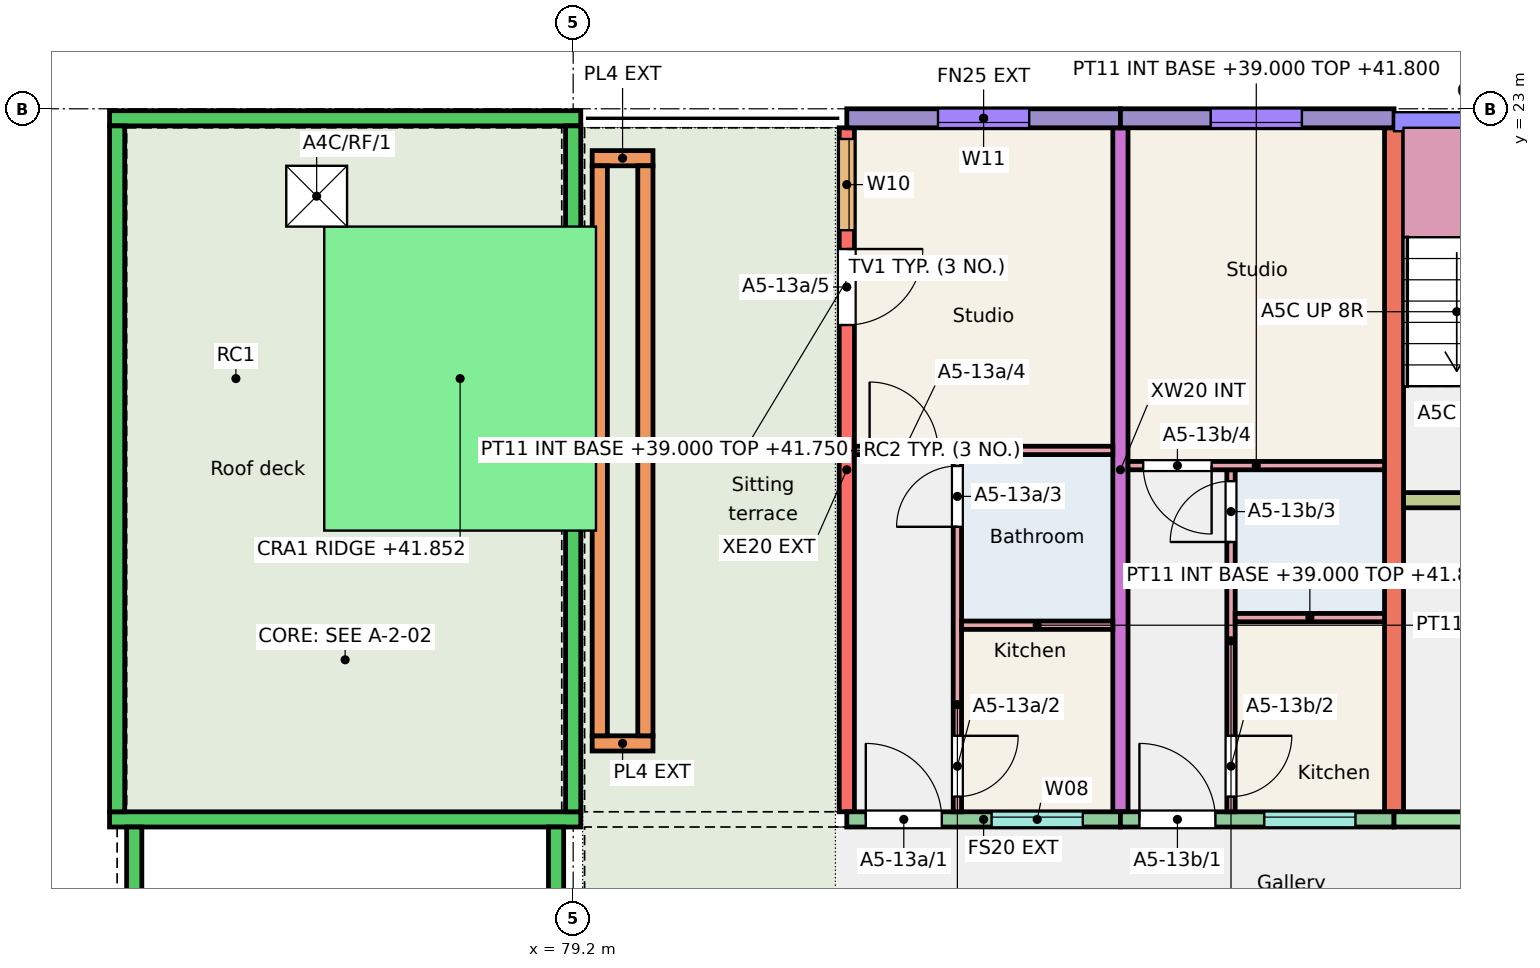
"""IFC4 building model, lengths in metres.
Left out: names, types, materials, properties, quantities, classifications, styles, units other than length and angle.
Written with IfcOpenShell. Run it as: python <this file> out.ifc"""

import sys

from ifc_helpers import new_model, si_unit, direction, frame, frame_2d, origin, origin_2d, place, context, subcontext, project, spatial, rectangle, extrude, element, fill, save


model = new_model("IFC4")
c1 = context("Model", 3, precision=1e-05, world=origin(), true_north=direction((0.0, 1.0)))
c2 = subcontext(c1, "Body", "Model", "MODEL_VIEW")
j1 = project(units=[si_unit("LENGTHUNIT", "METRE"), si_unit("PLANEANGLEUNIT", "RADIAN")], contexts=[c1])
p1 = place(None, origin())
s1 = spatial("IfcSite", under=j1, at=p1, CompositionType="ELEMENT")
p2 = place(p1, origin())
s2 = spatial("IfcBuilding", under=s1, at=p2, CompositionType="ELEMENT")
p3 = place(p2, frame((0.0, 0.0, 39.0)))
s3 = spatial("IfcBuildingStorey", under=s2, at=p3, CompositionType="ELEMENT", Elevation=39.0)
p4 = place(p3, frame((82.8, 13.75, 0.0), z_axis=(0.0, 0.0, 1.0), x_axis=(0.0, 1.0, 0.0)))
e1 = element("IfcWall", 1, at=p4, inside=s3, PredefinedType="SHEAR", context=c2, shape_type="SweptSolid", body=[
    extrude(rectangle(XDim=9.0, YDim=0.2, at=frame_2d((4.5, 0.0))), origin(), (0.0, 0.0, 1.0), 3.0),
])
p5 = place(p4, frame((7.653, 0.0, 0.9)))
e2 = element("IfcOpeningElement", 2, at=p5, cuts=e1, PredefinedType="OPENING", context=c2, shape_type="SweptSolid", body=[
    extrude(rectangle(XDim=1.2, YDim=1.5, at=frame_2d((0.6, 0.75))), frame((0.0, 0.11, 0.0), z_axis=(0.0, -1.0, 0.0), x_axis=(1.0, 0.0, 0.0)), (0.0, 0.0, 1.0), 0.22),
])
p6 = place(p4, frame((6.405, 0.0, 0.0)))
e3 = element("IfcOpeningElement", 3, at=p6, cuts=e1, PredefinedType="OPENING", context=c2, shape_type="SweptSolid", body=[
    extrude(rectangle(XDim=1.0, YDim=2.1, at=frame_2d((0.5, 1.05))), frame((0.0, 0.11, 0.0), z_axis=(0.0, -1.0, 0.0), x_axis=(1.0, 0.0, 0.0)), (0.0, 0.0, 1.0), 0.22),
])
p7 = place(p3, frame((86.4, 13.75, 0.0), z_axis=(0.0, 0.0, 1.0), x_axis=(0.0, 1.0, 0.0)))
e4 = element("IfcWall", 4, at=p7, inside=s3, PredefinedType="SHEAR", context=c2, shape_type="SweptSolid", body=[
    extrude(rectangle(XDim=9.0, YDim=0.2, at=frame_2d((4.5, 0.0))), origin(), (0.0, 0.0, 1.0), 3.0),
])
p8 = place(p3, frame((90.0, 13.75, 0.0), z_axis=(0.0, 0.0, 1.0), x_axis=(0.0, 1.0, 0.0)))
e5 = element("IfcWall", 5, at=p8, inside=s3, PredefinedType="SHEAR", context=c2, shape_type="SweptSolid", body=[
    extrude(rectangle(XDim=9.0, YDim=0.25, at=frame_2d((4.5, 0.0))), origin(), (0.0, 0.0, 1.0), 3.0),
])
p9 = place(p3, frame((82.8, 22.875, 0.0), z_axis=(0.0, 0.0, 1.0), x_axis=(1.0, 0.0, 0.0)))
e6 = element("IfcWall", 6, at=p9, inside=s3, PredefinedType="SOLIDWALL", context=c2, shape_type="SweptSolid", body=[
    extrude(rectangle(XDim=3.6, YDim=0.25, at=frame_2d((1.8, 0.0))), origin(), (0.0, 0.0, 1.0), 3.0),
])
p10 = place(p9, frame((1.2, 0.0, 0.8)))
e7 = element("IfcOpeningElement", 7, at=p10, cuts=e6, PredefinedType="OPENING", context=c2, shape_type="SweptSolid", body=[
    extrude(rectangle(XDim=1.2, YDim=1.6, at=frame_2d((0.6, 0.8))), frame((0.0, 0.135, 0.0), z_axis=(0.0, -1.0, 0.0), x_axis=(1.0, 0.0, 0.0)), (0.0, 0.0, 1.0), 0.27),
])
p11 = place(p3, frame((82.8, 13.65, 0.0), z_axis=(0.0, 0.0, 1.0), x_axis=(1.0, 0.0, 0.0)))
e8 = element("IfcWall", 8, at=p11, inside=s3, PredefinedType="SOLIDWALL", context=c2, shape_type="SweptSolid", body=[
    extrude(rectangle(XDim=3.6, YDim=0.2, at=frame_2d((1.8, 0.0))), origin(), (0.0, 0.0, 1.0), 3.0),
])
p12 = place(p11, frame((1.905, 0.0, 1.1)))
e9 = element("IfcOpeningElement", 9, at=p12, cuts=e8, PredefinedType="OPENING", context=c2, shape_type="SweptSolid", body=[
    extrude(rectangle(XDim=1.2, YDim=1.3, at=frame_2d((0.6, 0.65))), frame((0.0, 0.11, 0.0), z_axis=(0.0, -1.0, 0.0), x_axis=(1.0, 0.0, 0.0)), (0.0, 0.0, 1.0), 0.22),
])
p13 = place(p11, frame((0.25, 0.0, 0.0)))
e10 = element("IfcOpeningElement", 10, at=p13, cuts=e8, PredefinedType="OPENING", context=c2, shape_type="SweptSolid", body=[
    extrude(rectangle(XDim=1.0, YDim=2.1, at=frame_2d((0.5, 1.05))), frame((0.0, 0.11, 0.0), z_axis=(0.0, -1.0, 0.0), x_axis=(1.0, 0.0, 0.0)), (0.0, 0.0, 1.0), 0.22),
])
p14 = place(p3, frame((86.4, 22.875, 0.0), z_axis=(0.0, 0.0, 1.0), x_axis=(1.0, 0.0, 0.0)))
e11 = element("IfcWall", 11, at=p14, inside=s3, PredefinedType="SOLIDWALL", context=c2, shape_type="SweptSolid", body=[
    extrude(rectangle(XDim=3.6, YDim=0.25, at=frame_2d((1.8, 0.0))), origin(), (0.0, 0.0, 1.0), 3.0),
])
p15 = place(p14, frame((1.188, 0.0, 0.8)))
e12 = element("IfcOpeningElement", 12, at=p15, cuts=e11, PredefinedType="OPENING", context=c2, shape_type="SweptSolid", body=[
    extrude(rectangle(XDim=1.2, YDim=1.6, at=frame_2d((0.6, 0.8))), frame((0.0, 0.135, 0.0), z_axis=(0.0, -1.0, 0.0), x_axis=(1.0, 0.0, 0.0)), (0.0, 0.0, 1.0), 0.27),
])
p16 = place(p3, frame((86.4, 13.65, 0.0), z_axis=(0.0, 0.0, 1.0), x_axis=(1.0, 0.0, 0.0)))
e13 = element("IfcWall", 13, at=p16, inside=s3, PredefinedType="SOLIDWALL", context=c2, shape_type="SweptSolid", body=[
    extrude(rectangle(XDim=3.6, YDim=0.2, at=frame_2d((1.8, 0.0))), origin(), (0.0, 0.0, 1.0), 3.0),
])
p17 = place(p16, frame((1.893, 0.0, 1.1)))
e14 = element("IfcOpeningElement", 14, at=p17, cuts=e13, PredefinedType="OPENING", context=c2, shape_type="SweptSolid", body=[
    extrude(rectangle(XDim=1.2, YDim=1.3, at=frame_2d((0.6, 0.65))), frame((0.0, 0.11, 0.0), z_axis=(0.0, -1.0, 0.0), x_axis=(1.0, 0.0, 0.0)), (0.0, 0.0, 1.0), 0.22),
])
p18 = place(p16, frame((0.25, 0.0, 0.0)))
e15 = element("IfcOpeningElement", 15, at=p18, cuts=e13, PredefinedType="OPENING", context=c2, shape_type="SweptSolid", body=[
    extrude(rectangle(XDim=1.0, YDim=2.1, at=frame_2d((0.5, 1.05))), frame((0.0, 0.11, 0.0), z_axis=(0.0, -1.0, 0.0), x_axis=(1.0, 0.0, 0.0)), (0.0, 0.0, 1.0), 0.22),
])
p19 = place(p3, frame((90.0, 13.65, 0.0), z_axis=(0.0, 0.0, 1.0), x_axis=(1.0, 0.0, 0.0)))
e16 = element("IfcWall", 16, at=p19, inside=s3, PredefinedType="SHEAR", context=c2, shape_type="SweptSolid", body=[
    extrude(rectangle(XDim=5.85, YDim=0.2, at=frame_2d((2.925, 0.0))), origin(), (0.0, 0.0, 1.0), 3.0),
])
p20 = place(p19, frame((2.438, 0.0, 0.0)))
e17 = element("IfcOpeningElement", 17, at=p20, cuts=e16, PredefinedType="OPENING", context=c2, shape_type="SweptSolid", body=[
    extrude(rectangle(XDim=1.1, YDim=2.1, at=frame_2d((0.55, 1.05))), frame((0.0, 0.11, 0.0), z_axis=(0.0, -1.0, 0.0), x_axis=(1.0, 0.0, 0.0)), (0.0, 0.0, 1.0), 0.22),
])
p21 = place(p3, frame((90.125, 17.85, 0.0), z_axis=(0.0, 0.0, 1.0), x_axis=(1.0, 0.0, 0.0)))
e18 = element("IfcWall", 18, at=p21, inside=s3, PredefinedType="SHEAR", context=c2, shape_type="SweptSolid", body=[
    extrude(rectangle(XDim=5.725, YDim=0.2, at=frame_2d((2.863, 0.0))), origin(), (0.0, 0.0, 1.0), 3.0),
])
p22 = place(p21, frame((0.95, 0.0, 0.0)))
e19 = element("IfcOpeningElement", 19, at=p22, cuts=e18, PredefinedType="OPENING", context=c2, shape_type="SweptSolid", body=[
    extrude(rectangle(XDim=1.0, YDim=2.1, at=frame_2d((0.5, 1.05))), frame((0.0, 0.11, 0.0), z_axis=(0.0, -1.0, 0.0), x_axis=(1.0, 0.0, 0.0)), (0.0, 0.0, 1.0), 0.22),
])
p23 = place(p21, frame((3.863, 0.0, 0.0)))
e20 = element("IfcOpeningElement", 20, at=p23, cuts=e18, PredefinedType="OPENING", context=c2, shape_type="SweptSolid", body=[
    extrude(rectangle(XDim=1.1, YDim=2.1, at=frame_2d((0.55, 1.05))), frame((0.0, 0.11, 0.0), z_axis=(0.0, -1.0, 0.0), x_axis=(1.0, 0.0, 0.0)), (0.0, 0.0, 1.0), 0.22),
])
for number, where, z_axis, x_axis in (
    (21, (76.225, 17.85, 0.0), (0.0, 0.0, 1.0), (1.0, 0.0, 0.0)),
    (22, (76.225, 21.05, 0.0), (0.0, 0.0, 1.0), (1.0, 0.0, 0.0)),
):
    element("IfcWall", number, at=place(p3, frame(where, z_axis=z_axis, x_axis=x_axis)), inside=s3, PredefinedType="SHEAR", context=c2, shape_type="SweptSolid", body=[
        extrude(rectangle(XDim=2.975, YDim=0.2, at=frame_2d((1.487, 0.0))), origin(), (0.0, 0.0, 1.0), 1.5),
    ])
p24 = place(p3, frame((76.325, 17.95, 0.0), z_axis=(0.0, 0.0, 1.0), x_axis=(0.0, 1.0, 0.0)))
e23 = element("IfcWall", 23, at=p24, inside=s3, PredefinedType="SHEAR", context=c2, shape_type="SweptSolid", body=[
    extrude(rectangle(XDim=3.0, YDim=0.2, at=frame_2d((1.5, 0.0))), origin(), (0.0, 0.0, 1.0), 1.5),
])
p25 = place(p3, frame((79.125, 17.95, 0.0), z_axis=(0.0, 0.0, 1.0), x_axis=(0.0, 1.0, 0.0)))
e24 = element("IfcWall", 24, at=p25, inside=s3, PredefinedType="SHEAR", context=c2, shape_type="SweptSolid", body=[
    extrude(rectangle(XDim=3.0, YDim=0.15, at=frame_2d((1.5, 0.0))), origin(), (0.0, 0.0, 1.0), 1.5),
])
for number, where, z_axis, x_axis in (
    (25, (73.1, 22.875, 0.0), (0.0, 0.0, 1.0), (1.0, 0.0, 0.0)),
    (26, (73.1, 13.65, 0.0), (0.0, 0.0, 1.0), (1.0, 0.0, 0.0)),
):
    element("IfcWall", number, at=place(p3, frame(where, z_axis=z_axis, x_axis=x_axis)), inside=s3, PredefinedType="PARAPET", context=c2, shape_type="SweptSolid", body=[
        extrude(rectangle(XDim=6.2, YDim=0.2, at=frame_2d((3.1, 0.0))), origin(), (0.0, 0.0, 1.0), 1.1),
    ])
p26 = place(p3, frame((73.2, 13.75, 0.0), z_axis=(0.0, 0.0, 1.0), x_axis=(0.0, 1.0, 0.0)))
e27 = element("IfcWall", 27, at=p26, inside=s3, PredefinedType="PARAPET", context=c2, shape_type="SweptSolid", body=[
    extrude(rectangle(XDim=9.025, YDim=0.2, at=frame_2d((4.512, 0.0))), origin(), (0.0, 0.0, 1.0), 1.1),
])
p27 = place(p3, frame((79.2, 13.75, 0.0), z_axis=(0.0, 0.0, 1.0), x_axis=(0.0, 1.0, 0.0)))
e28 = element("IfcWall", 28, at=p27, inside=s3, PredefinedType="PARAPET", context=c2, shape_type="SweptSolid", body=[
    extrude(rectangle(XDim=4.0, YDim=0.2, at=frame_2d((2.0, 0.0))), origin(), (0.0, 0.0, 1.0), 1.1),
])
p28 = place(p3, frame((79.2, 21.15, 0.0), z_axis=(0.0, 0.0, 1.0), x_axis=(0.0, 1.0, 0.0)))
e29 = element("IfcWall", 29, at=p28, inside=s3, PredefinedType="PARAPET", context=c2, shape_type="SweptSolid", body=[
    extrude(rectangle(XDim=1.625, YDim=0.2, at=frame_2d((0.812, 0.0))), origin(), (0.0, 0.0, 1.0), 1.1),
])
for number, where, z_axis, x_axis in (
    (30, (73.425, 11.975, 0.0), (0.0, 0.0, 1.0), (0.0, 1.0, 0.0)),
    (31, (78.975, 11.975, 0.0), (0.0, 0.0, 1.0), (0.0, 1.0, 0.0)),
):
    element("IfcWall", number, at=place(p3, frame(where, z_axis=z_axis, x_axis=x_axis)), inside=s3, PredefinedType="PARAPET", context=c2, shape_type="SweptSolid", body=[
        extrude(rectangle(XDim=1.575, YDim=0.2, at=frame_2d((0.788, 0.0))), origin(), (0.0, 0.0, 1.0), 1.1),
    ])
for number, where, z_axis, x_axis in (
    (32, (79.45, 14.65, 0.01), (0.0, 0.0, 1.0), (1.0, 0.0, 0.0)),
    (33, (79.45, 22.35, 0.01), (0.0, 0.0, 1.0), (1.0, 0.0, 0.0)),
):
    element("IfcWall", number, at=place(p3, frame(where, z_axis=z_axis, x_axis=x_axis)), inside=s3, PredefinedType="SOLIDWALL", context=c2, shape_type="SweptSolid", body=[
        extrude(rectangle(XDim=0.8, YDim=0.2, at=frame_2d((0.4, 0.0))), origin(), (0.0, 0.0, 1.0), 0.45),
    ])
for number, where, z_axis, x_axis in (
    (34, (79.55, 14.75, 0.01), (0.0, 0.0, 1.0), (0.0, 1.0, 0.0)),
    (35, (80.15, 14.75, 0.01), (0.0, 0.0, 1.0), (0.0, 1.0, 0.0)),
):
    element("IfcWall", number, at=place(p3, frame(where, z_axis=z_axis, x_axis=x_axis)), inside=s3, PredefinedType="SOLIDWALL", context=c2, shape_type="SweptSolid", body=[
        extrude(rectangle(XDim=7.5, YDim=0.2, at=frame_2d((3.75, 0.0))), origin(), (0.0, 0.0, 1.0), 0.45),
    ])
p29 = place(p3, frame((84.255, 13.75, 0.0), z_axis=(0.0, 0.0, 1.0), x_axis=(0.0, 1.0, 0.0)))
e36 = element("IfcWall", 36, at=p29, inside=s3, PredefinedType="PARTITIONING", context=c2, shape_type="SweptSolid", body=[
    extrude(rectangle(XDim=4.7, YDim=0.11, at=frame_2d((2.35, 0.0))), origin(), (0.0, 0.0, 1.0), 2.75),
])
p30 = place(p29, frame((0.2, 0.0, 0.0)))
e37 = element("IfcOpeningElement", 37, at=p30, cuts=e36, PredefinedType="OPENING", context=c2, shape_type="SweptSolid", body=[
    extrude(rectangle(XDim=0.8, YDim=2.1, at=frame_2d((0.4, 1.05))), frame((0.0, 0.065, 0.0), z_axis=(0.0, -1.0, 0.0), x_axis=(1.0, 0.0, 0.0)), (0.0, 0.0, 1.0), 0.13),
])
p31 = place(p29, frame((3.75, 0.0, 0.0)))
e38 = element("IfcOpeningElement", 38, at=p31, cuts=e36, PredefinedType="OPENING", context=c2, shape_type="SweptSolid", body=[
    extrude(rectangle(XDim=0.8, YDim=2.1, at=frame_2d((0.4, 1.05))), frame((0.0, 0.065, 0.0), z_axis=(0.0, -1.0, 0.0), x_axis=(1.0, 0.0, 0.0)), (0.0, 0.0, 1.0), 0.13),
])
p32 = place(p3, frame((84.31, 16.205, 0.0), z_axis=(0.0, 0.0, 1.0), x_axis=(1.0, 0.0, 0.0)))
e39 = element("IfcWall", 39, at=p32, inside=s3, PredefinedType="PARTITIONING", context=c2, shape_type="SweptSolid", body=[
    extrude(rectangle(XDim=1.99, YDim=0.11, at=frame_2d((0.995, 0.0))), origin(), (0.0, 0.0, 1.0), 2.75),
])
p33 = place(p3, frame((82.9, 18.505, 0.0), z_axis=(0.0, 0.0, 1.0), x_axis=(1.0, 0.0, 0.0)))
e40 = element("IfcWall", 40, at=p33, inside=s3, PredefinedType="PARTITIONING", context=c2, shape_type="SweptSolid", body=[
    extrude(rectangle(XDim=3.4, YDim=0.11, at=frame_2d((1.7, 0.0))), origin(), (0.0, 0.0, 1.0), 2.75),
])
p34 = place(p33, frame((0.2, 0.0, 0.0)))
e41 = element("IfcOpeningElement", 41, at=p34, cuts=e40, PredefinedType="OPENING", context=c2, shape_type="SweptSolid", body=[
    extrude(rectangle(XDim=0.9, YDim=2.1, at=frame_2d((0.45, 1.05))), frame((0.0, 0.065, 0.0), z_axis=(0.0, -1.0, 0.0), x_axis=(1.0, 0.0, 0.0)), (0.0, 0.0, 1.0), 0.13),
])
p35 = place(p3, frame((87.855, 13.75, 0.0), z_axis=(0.0, 0.0, 1.0), x_axis=(0.0, 1.0, 0.0)))
e42 = element("IfcWall", 42, at=p35, inside=s3, PredefinedType="PARTITIONING", context=c2, shape_type="SweptSolid", body=[
    extrude(rectangle(XDim=4.5, YDim=0.11, at=frame_2d((2.25, 0.0))), origin(), (0.0, 0.0, 1.0), 2.8),
])
p36 = place(p35, frame((0.2, 0.0, 0.0)))
e43 = element("IfcOpeningElement", 43, at=p36, cuts=e42, PredefinedType="OPENING", context=c2, shape_type="SweptSolid", body=[
    extrude(rectangle(XDim=0.8, YDim=2.1, at=frame_2d((0.4, 1.05))), frame((0.0, 0.065, 0.0), z_axis=(0.0, -1.0, 0.0), x_axis=(1.0, 0.0, 0.0)), (0.0, 0.0, 1.0), 0.13),
])
p37 = place(p35, frame((3.55, 0.0, 0.0)))
e44 = element("IfcOpeningElement", 44, at=p37, cuts=e42, PredefinedType="OPENING", context=c2, shape_type="SweptSolid", body=[
    extrude(rectangle(XDim=0.8, YDim=2.1, at=frame_2d((0.4, 1.05))), frame((0.0, 0.065, 0.0), z_axis=(0.0, -1.0, 0.0), x_axis=(1.0, 0.0, 0.0)), (0.0, 0.0, 1.0), 0.13),
])
p38 = place(p3, frame((87.91, 16.305, 0.0), z_axis=(0.0, 0.0, 1.0), x_axis=(1.0, 0.0, 0.0)))
e45 = element("IfcWall", 45, at=p38, inside=s3, PredefinedType="PARTITIONING", context=c2, shape_type="SweptSolid", body=[
    extrude(rectangle(XDim=1.965, YDim=0.11, at=frame_2d((0.982, 0.0))), origin(), (0.0, 0.0, 1.0), 2.8),
])
p39 = place(p3, frame((86.5, 18.305, 0.0), z_axis=(0.0, 0.0, 1.0), x_axis=(1.0, 0.0, 0.0)))
e46 = element("IfcWall", 46, at=p39, inside=s3, PredefinedType="PARTITIONING", context=c2, shape_type="SweptSolid", body=[
    extrude(rectangle(XDim=3.375, YDim=0.11, at=frame_2d((1.688, 0.0))), origin(), (0.0, 0.0, 1.0), 2.8),
])
p40 = place(p39, frame((0.2, 0.0, 0.0)))
e47 = element("IfcOpeningElement", 47, at=p40, cuts=e46, PredefinedType="OPENING", context=c2, shape_type="SweptSolid", body=[
    extrude(rectangle(XDim=0.9, YDim=2.1, at=frame_2d((0.45, 1.05))), frame((0.0, 0.065, 0.0), z_axis=(0.0, -1.0, 0.0), x_axis=(1.0, 0.0, 0.0)), (0.0, 0.0, 1.0), 0.13),
])
p41 = place(p3, frame((0.0, 0.0, -0.25)))
p42 = place(p41, frame((75.825, 21.85, 0.0)))
p43 = place(p42, frame((0.0, 0.0, 0.2)))
e48 = element("IfcDoor", 48, at=p43, inside=s3, OperationType="SINGLE_SWING_LEFT", PredefinedType="TRAPDOOR", context=c2, shape_type="SweptSolid", body=[
    extrude(rectangle(XDim=0.8, YDim=0.8, at=origin_2d()), origin(), (0.0, 0.0, 1.0), 0.05),
])
p44 = place(p12, origin())
e49 = element("IfcWindow", 49, at=p44, inside=s3, PartitioningType="SINGLE_PANEL", PredefinedType="WINDOW", context=c2, shape_type="SweptSolid", body=[
    extrude(rectangle(XDim=1.2, YDim=1.3, at=frame_2d((0.6, 0.65))), frame((0.0, 0.06, 0.0), z_axis=(0.0, -1.0, 0.0), x_axis=(1.0, 0.0, 0.0)), (0.0, 0.0, 1.0), 0.06),
])
fill(e9, e49)
p45 = place(p10, origin())
e50 = element("IfcWindow", 50, at=p45, inside=s3, PartitioningType="SINGLE_PANEL", PredefinedType="WINDOW", context=c2, shape_type="SweptSolid", body=[
    extrude(rectangle(XDim=1.2, YDim=1.6, at=frame_2d((0.6, 0.8))), frame((0.0, -0.025, 0.0), z_axis=(0.0, -1.0, 0.0), x_axis=(1.0, 0.0, 0.0)), (0.0, 0.0, 1.0), 0.06),
])
fill(e7, e50)
p46 = place(p5, origin())
e51 = element("IfcWindow", 51, at=p46, inside=s3, PartitioningType="SINGLE_PANEL", PredefinedType="WINDOW", context=c2, shape_type="SweptSolid", body=[
    extrude(rectangle(XDim=1.2, YDim=1.5, at=frame_2d((0.6, 0.75))), frame((0.0, 0.0, 0.0), z_axis=(0.0, -1.0, 0.0), x_axis=(1.0, 0.0, 0.0)), (0.0, 0.0, 1.0), 0.06),
])
fill(e2, e51)
p47 = place(p17, origin())
e52 = element("IfcWindow", 52, at=p47, inside=s3, PartitioningType="SINGLE_PANEL", PredefinedType="WINDOW", context=c2, shape_type="SweptSolid", body=[
    extrude(rectangle(XDim=1.2, YDim=1.3, at=frame_2d((0.6, 0.65))), frame((0.0, 0.06, 0.0), z_axis=(0.0, -1.0, 0.0), x_axis=(1.0, 0.0, 0.0)), (0.0, 0.0, 1.0), 0.06),
])
fill(e14, e52)
p48 = place(p15, origin())
e53 = element("IfcWindow", 53, at=p48, inside=s3, PartitioningType="SINGLE_PANEL", PredefinedType="WINDOW", context=c2, shape_type="SweptSolid", body=[
    extrude(rectangle(XDim=1.2, YDim=1.6, at=frame_2d((0.6, 0.8))), frame((0.0, -0.025, 0.0), z_axis=(0.0, -1.0, 0.0), x_axis=(1.0, 0.0, 0.0)), (0.0, 0.0, 1.0), 0.06),
])
fill(e12, e53)
p49 = place(p13, origin())
e54 = element("IfcDoor", 54, at=p49, inside=s3, OperationType="SINGLE_SWING_LEFT", PredefinedType="DOOR", context=c2, shape_type="SweptSolid", body=[
    extrude(rectangle(XDim=1.0, YDim=2.1, at=frame_2d((0.5, 1.05))), frame((0.0, 0.025, 0.0), z_axis=(0.0, -1.0, 0.0), x_axis=(1.0, 0.0, 0.0)), (0.0, 0.0, 1.0), 0.05),
])
fill(e10, e54)
p50 = place(p30, origin())
e55 = element("IfcDoor", 55, at=p50, inside=s3, OperationType="SINGLE_SWING_RIGHT", PredefinedType="DOOR", context=c2, shape_type="SweptSolid", body=[
    extrude(rectangle(XDim=0.8, YDim=2.1, at=frame_2d((0.4, 1.05))), frame((0.0, 0.025, 0.0), z_axis=(0.0, -1.0, 0.0), x_axis=(1.0, 0.0, 0.0)), (0.0, 0.0, 1.0), 0.05),
])
fill(e37, e55)
p51 = place(p31, origin())
e56 = element("IfcDoor", 56, at=p51, inside=s3, OperationType="SINGLE_SWING_LEFT", PredefinedType="DOOR", context=c2, shape_type="SweptSolid", body=[
    extrude(rectangle(XDim=0.8, YDim=2.1, at=frame_2d((0.4, 1.05))), frame((0.0, 0.025, 0.0), z_axis=(0.0, -1.0, 0.0), x_axis=(1.0, 0.0, 0.0)), (0.0, 0.0, 1.0), 0.05),
])
fill(e38, e56)
p52 = place(p34, origin())
e57 = element("IfcDoor", 57, at=p52, inside=s3, OperationType="SINGLE_SWING_LEFT", PredefinedType="DOOR", context=c2, shape_type="SweptSolid", body=[
    extrude(rectangle(XDim=0.9, YDim=2.1, at=frame_2d((0.45, 1.05))), frame((0.0, 0.025, 0.0), z_axis=(0.0, -1.0, 0.0), x_axis=(1.0, 0.0, 0.0)), (0.0, 0.0, 1.0), 0.05),
])
fill(e41, e57)
p53 = place(p6, origin())
e58 = element("IfcDoor", 58, at=p53, inside=s3, OperationType="SINGLE_SWING_RIGHT", PredefinedType="DOOR", context=c2, shape_type="SweptSolid", body=[
    extrude(rectangle(XDim=1.0, YDim=2.1, at=frame_2d((0.5, 1.05))), frame((0.0, 0.025, 0.0), z_axis=(0.0, -1.0, 0.0), x_axis=(1.0, 0.0, 0.0)), (0.0, 0.0, 1.0), 0.05),
])
fill(e3, e58)
p54 = place(p18, origin())
e59 = element("IfcDoor", 59, at=p54, inside=s3, OperationType="SINGLE_SWING_LEFT", PredefinedType="DOOR", context=c2, shape_type="SweptSolid", body=[
    extrude(rectangle(XDim=1.0, YDim=2.1, at=frame_2d((0.5, 1.05))), frame((0.0, 0.025, 0.0), z_axis=(0.0, -1.0, 0.0), x_axis=(1.0, 0.0, 0.0)), (0.0, 0.0, 1.0), 0.05),
])
fill(e15, e59)
p55 = place(p36, origin())
e60 = element("IfcDoor", 60, at=p55, inside=s3, OperationType="SINGLE_SWING_RIGHT", PredefinedType="DOOR", context=c2, shape_type="SweptSolid", body=[
    extrude(rectangle(XDim=0.8, YDim=2.1, at=frame_2d((0.4, 1.05))), frame((0.0, 0.025, 0.0), z_axis=(0.0, -1.0, 0.0), x_axis=(1.0, 0.0, 0.0)), (0.0, 0.0, 1.0), 0.05),
])
fill(e43, e60)
p56 = place(p37, origin())
e61 = element("IfcDoor", 61, at=p56, inside=s3, OperationType="SINGLE_SWING_LEFT", PredefinedType="DOOR", context=c2, shape_type="SweptSolid", body=[
    extrude(rectangle(XDim=0.8, YDim=2.1, at=frame_2d((0.4, 1.05))), frame((0.0, 0.025, 0.0), z_axis=(0.0, -1.0, 0.0), x_axis=(1.0, 0.0, 0.0)), (0.0, 0.0, 1.0), 0.05),
])
fill(e44, e61)
p57 = place(p40, origin())
e62 = element("IfcDoor", 62, at=p57, inside=s3, OperationType="SINGLE_SWING_RIGHT", PredefinedType="DOOR", context=c2, shape_type="SweptSolid", body=[
    extrude(rectangle(XDim=0.9, YDim=2.1, at=frame_2d((0.45, 1.05))), frame((0.0, 0.025, 0.0), z_axis=(0.0, -1.0, 0.0), x_axis=(1.0, 0.0, 0.0)), (0.0, 0.0, 1.0), 0.05),
])
fill(e47, e62)
save(model, sys.argv[1])
